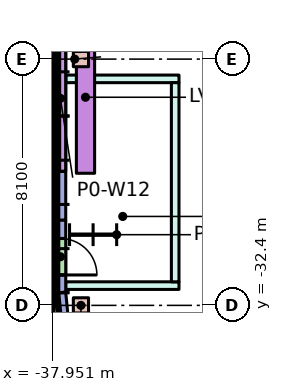
"""IFC4 building model, lengths in metres.
Left out: names, types, materials, properties, quantities, classifications, styles, units other than length and angle.
Written with IfcOpenShell. Run it as: python <this file> out.ifc"""

import sys

from ifc_helpers import new_model, si_unit, direction, frame, frame_2d, origin, origin_2d, place, context, subcontext, project, spatial, rectangle, extrude, element, fill, save


model = new_model("IFC4")
c1 = context("Model", 3, precision=1e-05, world=origin(), true_north=direction((0.0, 1.0)))
c2 = subcontext(c1, "Body", "Model", "MODEL_VIEW")
j1 = project(units=[si_unit("LENGTHUNIT", "METRE"), si_unit("PLANEANGLEUNIT", "RADIAN")], contexts=[c1])
p1 = place(None, origin())
s1 = spatial("IfcSite", under=j1, at=p1, CompositionType="ELEMENT")
p2 = place(p1, origin())
s2 = spatial("IfcBuilding", under=s1, at=p2, CompositionType="ELEMENT")
p3 = place(p2, origin())
s3 = spatial("IfcBuildingStorey", under=s2, at=p3, CompositionType="ELEMENT", Elevation=0.0)
for number, where, z_axis, x_axis in (
    (1, (-37.0, -32.4, 0.0), (0.0, 0.0, 1.0), (1.0, 0.0, 0.0)),
    (2, (-37.0, -24.3, 0.0), (0.0, 0.0, 1.0), (1.0, 0.0, 0.0)),
):
    element("IfcColumn", number, at=place(p3, frame(where, z_axis=z_axis, x_axis=x_axis)), inside=s3, PredefinedType="COLUMN", context=c2, shape_type="SweptSolid", body=[
        extrude(rectangle(XDim=0.5, YDim=0.5, at=origin_2d()), origin(), (0.0, 0.0, 1.0), 6.0),
    ])
p4 = place(p3, frame((-37.675, -21.583, 0.0), z_axis=(0.0, 0.0, 1.0), x_axis=(0.0, -1.0, 0.0)))
e3 = element("IfcWall", 3, at=p4, inside=s3, PredefinedType="STANDARD", context=c2, shape_type="SweptSolid", body=[
    extrude(rectangle(XDim=8.017, YDim=0.35, at=frame_2d((4.008, 0.0))), origin(), (0.0, 0.0, 1.0), 5.68),
])
p5 = place(p4, frame((1.608, 0.0, 0.3)))
e4 = element("IfcOpeningElement", 4, at=p5, cuts=e3, PredefinedType="OPENING", context=c2, shape_type="SweptSolid", body=[
    extrude(rectangle(XDim=4.8, YDim=4.5, at=frame_2d((2.4, 2.25))), frame((0.0, 0.185, 0.0), z_axis=(0.0, -1.0, 0.0), x_axis=(1.0, 0.0, 0.0)), (0.0, 0.0, 1.0), 0.37),
])
p6 = place(p3, frame((-37.675, -29.6, 0.0), z_axis=(0.0, 0.0, 1.0), x_axis=(0.0, -1.0, 0.0)))
e5 = element("IfcWall", 5, at=p6, inside=s3, PredefinedType="STANDARD", context=c2, shape_type="SweptSolid", body=[
    extrude(rectangle(XDim=2.384, YDim=0.35, at=frame_2d((1.192, 0.0))), origin(), (0.0, 0.0, 1.0), 5.68),
])
p7 = place(p6, frame((0.6, 0.0, 0.0)))
e6 = element("IfcOpeningElement", 6, at=p7, cuts=e5, PredefinedType="OPENING", context=c2, shape_type="SweptSolid", body=[
    extrude(rectangle(XDim=1.2, YDim=2.4, at=frame_2d((0.6, 1.2))), frame((0.0, 0.185, 0.0), z_axis=(0.0, -1.0, 0.0), x_axis=(1.0, 0.0, 0.0)), (0.0, 0.0, 1.0), 0.37),
])
p8 = place(p3, frame((-37.675, -31.984, 0.0), z_axis=(0.0, 0.0, 1.0), x_axis=(0.097993192849, -0.995187085002, 0.0)))
e7 = element("IfcWall", 7, at=p8, inside=s3, PredefinedType="STANDARD", context=c2, shape_type="SweptSolid", body=[
    extrude(rectangle(XDim=2.304, YDim=0.35, at=frame_2d((1.152, 0.0))), origin(), (0.0, 0.0, 1.0), 5.68),
])
p9 = place(p3, frame((-36.85, -23.055, 6.0), z_axis=(0.0, 0.0, 1.0), x_axis=(0.0, -1.0, 0.0)))
e8 = element("IfcWall", 8, at=p9, inside=s3, PredefinedType="PARAPET", context=c2, shape_type="SweptSolid", body=[
    extrude(rectangle(XDim=5.0, YDim=0.6, at=frame_2d((2.5, 0.0))), origin(), (0.0, 0.0, 1.0), 0.9),
])
for number, where, z_axis, x_axis in (
    (9, (-37.5, -31.75, 0.0), (0.0, 0.0, 1.0), (1.0, 0.0, 0.0)),
    (10, (-37.5, -24.95, 0.0), (0.0, 0.0, 1.0), (1.0, 0.0, 0.0)),
):
    element("IfcWall", number, at=place(p3, frame(where, z_axis=z_axis, x_axis=x_axis)), inside=s3, PredefinedType="STANDARD", context=c2, shape_type="SweptSolid", body=[
        extrude(rectangle(XDim=3.725, YDim=0.25, at=frame_2d((1.863, 0.0))), origin(), (0.0, 0.0, 1.0), 5.68),
    ])
p10 = place(p3, frame((-33.9, -31.625, 0.0), z_axis=(0.0, 0.0, 1.0), x_axis=(0.0, 1.0, 0.0)))
e11 = element("IfcWall", 11, at=p10, inside=s3, PredefinedType="STANDARD", context=c2, shape_type="SweptSolid", body=[
    extrude(rectangle(XDim=6.55, YDim=0.25, at=frame_2d((3.275, 0.0))), origin(), (0.0, 0.0, 1.0), 5.68),
])
p11 = place(p5, origin())
e12 = element("IfcWindow", 12, at=p11, inside=s3, PartitioningType="SINGLE_PANEL", PredefinedType="WINDOW", context=c2, shape_type="SweptSolid", body=[
    extrude(rectangle(XDim=4.8, YDim=4.5, at=frame_2d((2.4, 2.25))), frame((0.0, 0.03, 0.0), z_axis=(0.0, -1.0, 0.0), x_axis=(1.0, 0.0, 0.0)), (0.0, 0.0, 1.0), 0.06),
])
fill(e4, e12)
p12 = place(p7, frame((1.2, 0.0, 0.0), z_axis=(0.0, 0.0, 1.0), x_axis=(-1.0, 0.0, 0.0)))
e13 = element("IfcDoor", 13, at=p12, inside=s3, OperationType="SINGLE_SWING_RIGHT", PredefinedType="DOOR", context=c2, shape_type="SweptSolid", body=[
    extrude(rectangle(XDim=1.2, YDim=2.4, at=frame_2d((0.6, 1.2))), frame((0.0, 0.025, 0.0), z_axis=(0.0, -1.0, 0.0), x_axis=(1.0, 0.0, 0.0)), (0.0, 0.0, 1.0), 0.05),
])
fill(e6, e13)
save(model, sys.argv[1])
